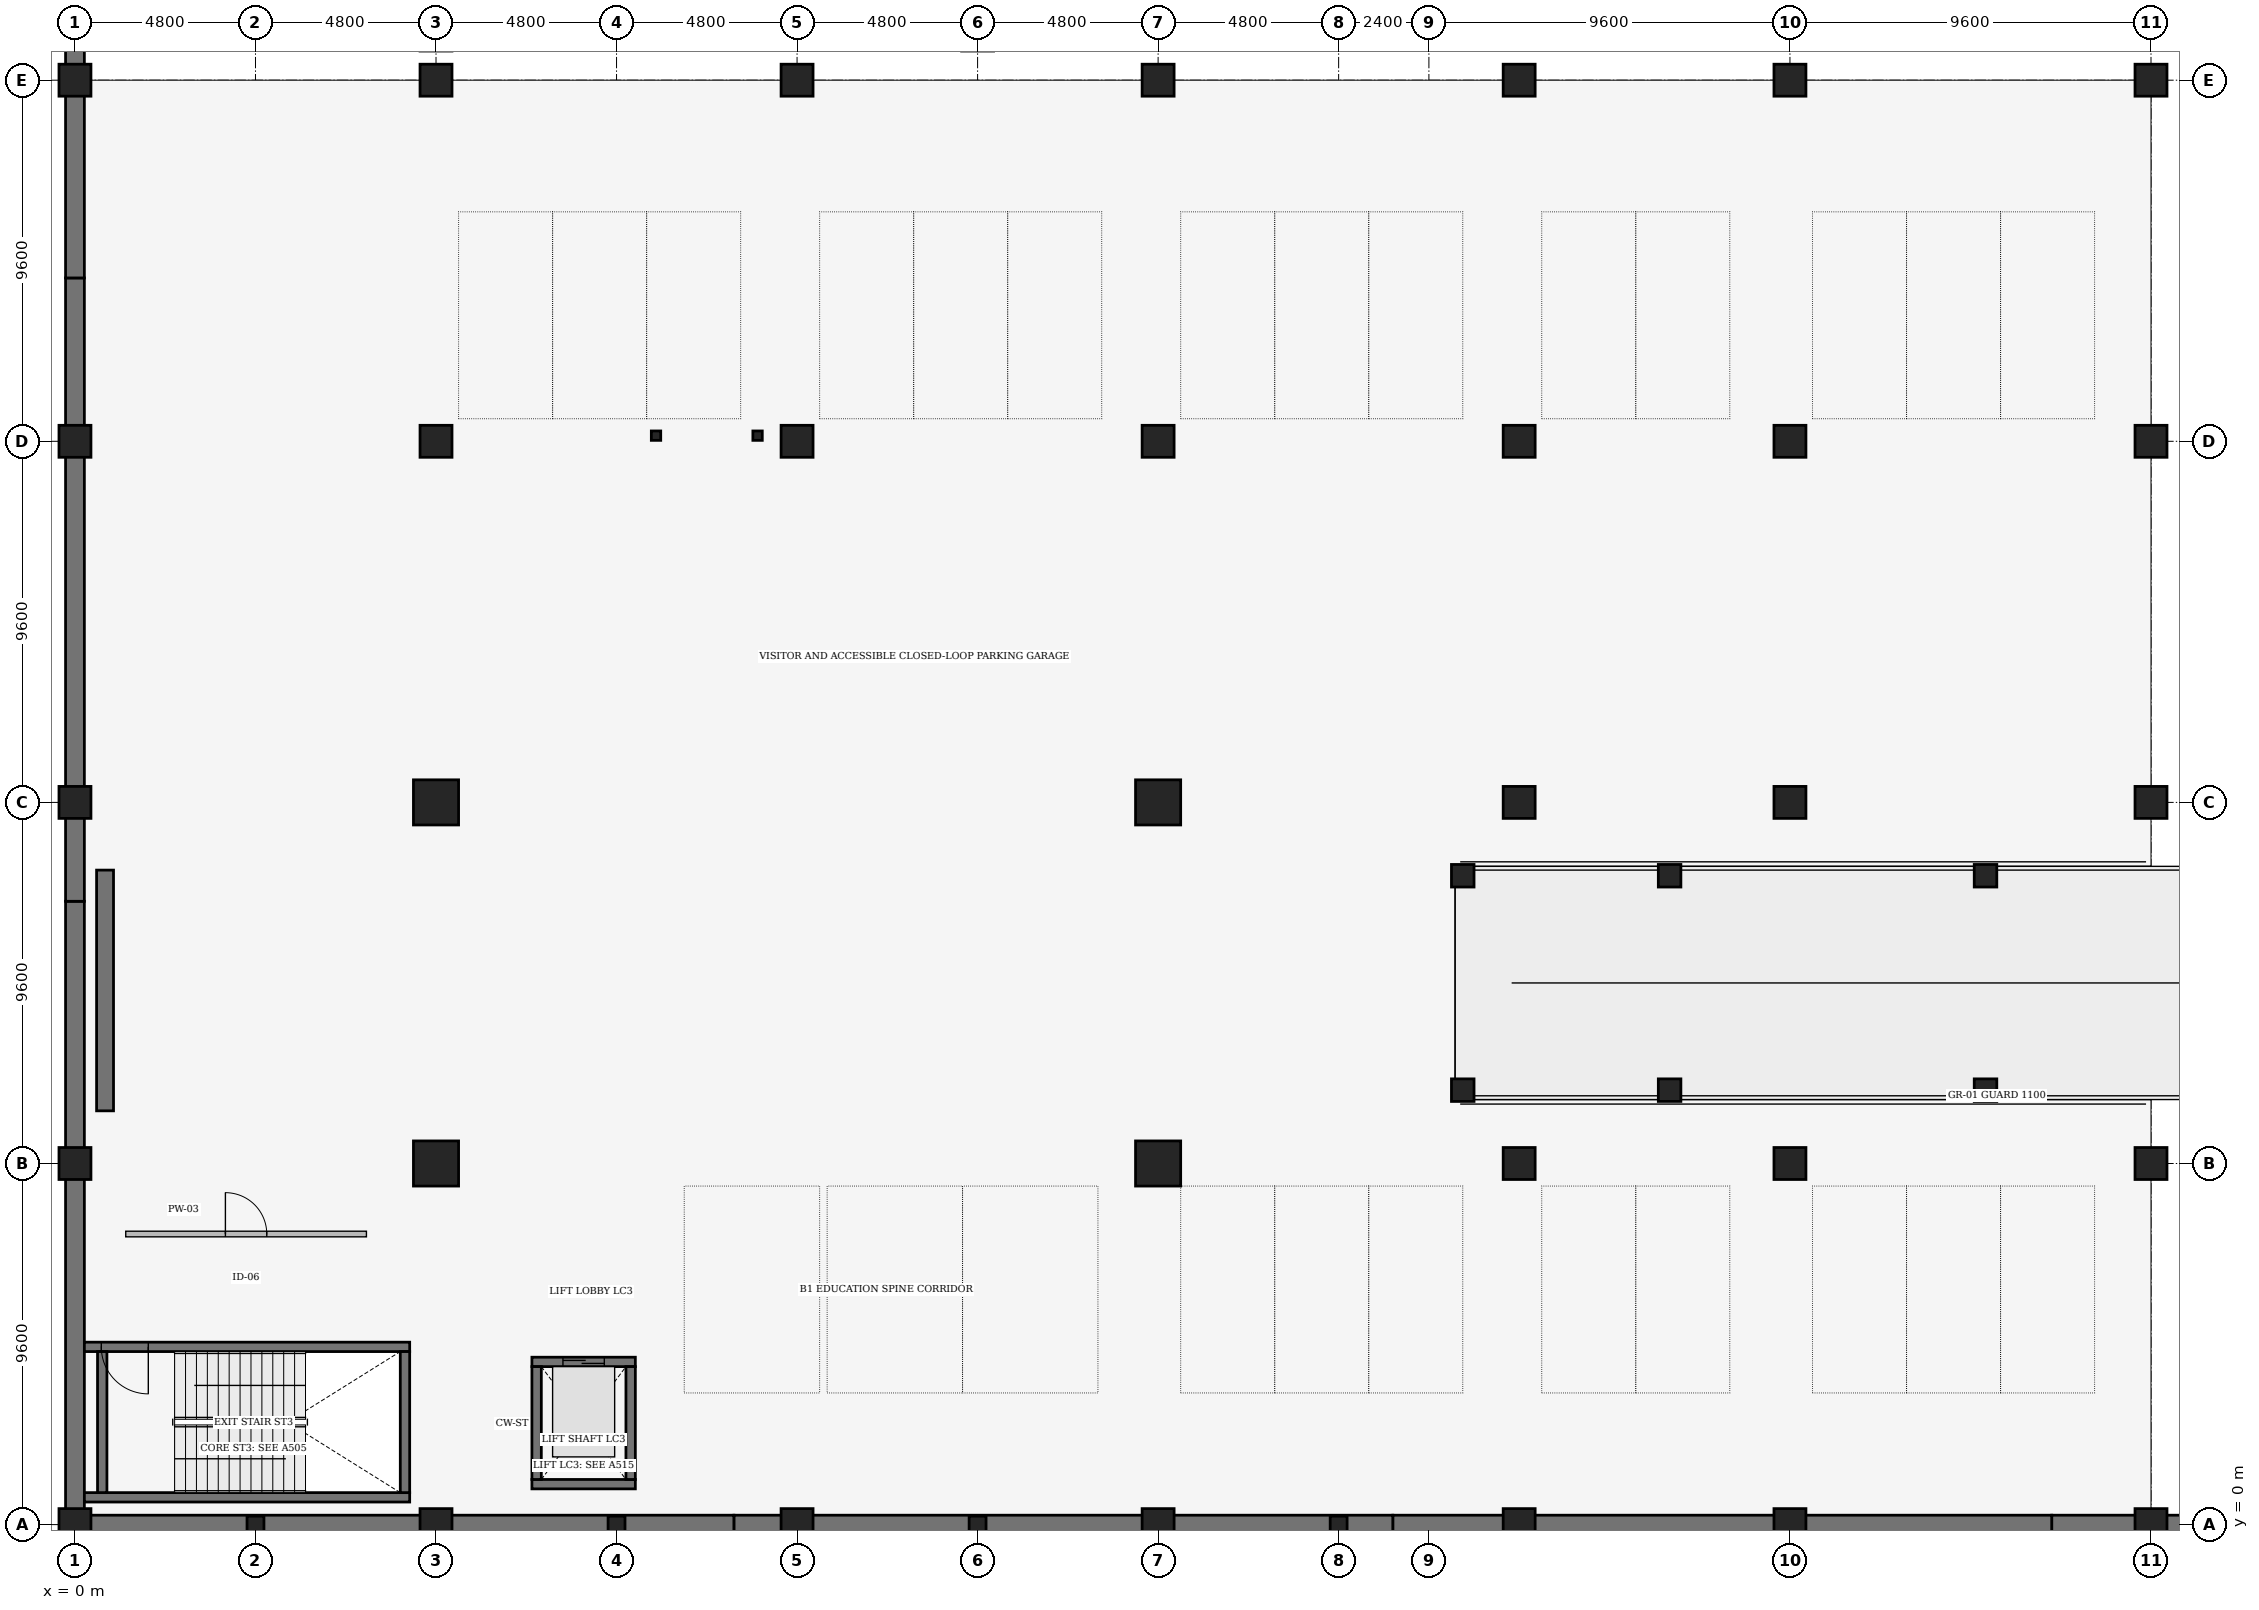
"""IFC4 building model, lengths in metres.
Left out: names, types, materials, properties, quantities, classifications, styles, units other than length and angle.
Written with IfcOpenShell. Run it as: python <this file> out.ifc"""

import sys

from ifc_helpers import new_model, si_unit, direction, frame, frame_2d, origin, origin_2d, place, context, subcontext, project, spatial, rectangle, hollow_rectangle, extrude, element, fill, save


model = new_model("IFC4")
c1 = context("Model", 3, precision=1e-05, world=origin(), true_north=direction((0.0, 1.0)))
c2 = subcontext(c1, "Body", "Model", "MODEL_VIEW")
j1 = project(units=[si_unit("LENGTHUNIT", "METRE"), si_unit("PLANEANGLEUNIT", "RADIAN")], contexts=[c1])
p1 = place(None, origin())
s1 = spatial("IfcSite", under=j1, at=p1, CompositionType="ELEMENT")
p2 = place(p1, origin())
s2 = spatial("IfcBuilding", under=s1, at=p2, CompositionType="ELEMENT")
p3 = place(p2, frame((0.0, 0.0, -4.8)))
s3 = spatial("IfcBuildingStorey", under=s2, at=p3, CompositionType="ELEMENT", Elevation=-4.8)
for number, where, z_axis, x_axis in (
    (1, (0.0, 0.0, 0.0), (0.0, 0.0, 1.0), (1.0, 0.0, 0.0)),
    (2, (0.0, 9.6, 0.0), (0.0, 0.0, 1.0), (1.0, 0.0, 0.0)),
    (3, (0.0, 19.2, 0.0), (0.0, 0.0, 1.0), (1.0, 0.0, 0.0)),
    (4, (0.0, 28.8, 0.0), (0.0, 0.0, 1.0), (1.0, 0.0, 0.0)),
    (5, (0.0, 38.4, 0.0), (0.0, 0.0, 1.0), (1.0, 0.0, 0.0)),
    (6, (9.6, 0.0, 0.0), (0.0, 0.0, 1.0), (1.0, 0.0, 0.0)),
):
    element("IfcColumn", number, at=place(p3, frame(where, z_axis=z_axis, x_axis=x_axis)), inside=s3, PredefinedType="COLUMN", context=c2, shape_type="SweptSolid", body=[
        extrude(rectangle(XDim=0.85, YDim=0.85, at=origin_2d()), origin(), (0.0, 0.0, 1.0), 4.8),
    ])
for number, where, z_axis, x_axis in (
    (7, (9.6, 9.6, 0.0), (0.0, 0.0, 1.0), (1.0, 0.0, 0.0)),
    (8, (9.6, 19.2, 0.0), (0.0, 0.0, 1.0), (1.0, 0.0, 0.0)),
):
    element("IfcColumn", number, at=place(p3, frame(where, z_axis=z_axis, x_axis=x_axis)), inside=s3, PredefinedType="COLUMN", context=c2, shape_type="SweptSolid", body=[
        extrude(rectangle(XDim=1.2, YDim=1.2, at=origin_2d()), origin(), (0.0, 0.0, 1.0), 4.8),
    ])
for number, where, z_axis, x_axis in (
    (9, (9.6, 28.8, 0.0), (0.0, 0.0, 1.0), (1.0, 0.0, 0.0)),
    (10, (9.6, 38.4, 0.0), (0.0, 0.0, 1.0), (1.0, 0.0, 0.0)),
    (11, (19.2, 0.0, 0.0), (0.0, 0.0, 1.0), (1.0, 0.0, 0.0)),
    (12, (19.2, 28.8, 0.0), (0.0, 0.0, 1.0), (1.0, 0.0, 0.0)),
    (13, (19.2, 38.4, 0.0), (0.0, 0.0, 1.0), (1.0, 0.0, 0.0)),
    (14, (28.8, 0.0, 0.0), (0.0, 0.0, 1.0), (1.0, 0.0, 0.0)),
):
    element("IfcColumn", number, at=place(p3, frame(where, z_axis=z_axis, x_axis=x_axis)), inside=s3, PredefinedType="COLUMN", context=c2, shape_type="SweptSolid", body=[
        extrude(rectangle(XDim=0.85, YDim=0.85, at=origin_2d()), origin(), (0.0, 0.0, 1.0), 4.8),
    ])
for number, where, z_axis, x_axis in (
    (15, (28.8, 9.6, 0.0), (0.0, 0.0, 1.0), (1.0, 0.0, 0.0)),
    (16, (28.8, 19.2, 0.0), (0.0, 0.0, 1.0), (1.0, 0.0, 0.0)),
):
    element("IfcColumn", number, at=place(p3, frame(where, z_axis=z_axis, x_axis=x_axis)), inside=s3, PredefinedType="COLUMN", context=c2, shape_type="SweptSolid", body=[
        extrude(rectangle(XDim=1.2, YDim=1.2, at=origin_2d()), origin(), (0.0, 0.0, 1.0), 4.8),
    ])
for number, where, z_axis, x_axis in (
    (17, (28.8, 28.8, 0.0), (0.0, 0.0, 1.0), (1.0, 0.0, 0.0)),
    (18, (28.8, 38.4, 0.0), (0.0, 0.0, 1.0), (1.0, 0.0, 0.0)),
    (19, (38.4, 0.0, 0.0), (0.0, 0.0, 1.0), (1.0, 0.0, 0.0)),
    (20, (38.4, 9.6, 0.0), (0.0, 0.0, 1.0), (1.0, 0.0, 0.0)),
    (21, (38.4, 19.2, 0.0), (0.0, 0.0, 1.0), (1.0, 0.0, 0.0)),
    (22, (38.4, 28.8, 0.0), (0.0, 0.0, 1.0), (1.0, 0.0, 0.0)),
    (23, (38.4, 38.4, 0.0), (0.0, 0.0, 1.0), (1.0, 0.0, 0.0)),
    (24, (45.6, 0.0, 0.0), (0.0, 0.0, 1.0), (1.0, 0.0, 0.0)),
    (25, (45.6, 9.6, 0.0), (0.0, 0.0, 1.0), (1.0, 0.0, 0.0)),
    (26, (45.6, 19.2, 0.0), (0.0, 0.0, 1.0), (1.0, 0.0, 0.0)),
    (27, (45.6, 28.8, 0.0), (0.0, 0.0, 1.0), (1.0, 0.0, 0.0)),
    (28, (45.6, 38.4, 0.0), (0.0, 0.0, 1.0), (1.0, 0.0, 0.0)),
    (29, (55.2, 0.0, 0.0), (0.0, 0.0, 1.0), (1.0, 0.0, 0.0)),
    (30, (55.2, 9.6, 0.0), (0.0, 0.0, 1.0), (1.0, 0.0, 0.0)),
    (31, (55.2, 19.2, 0.0), (0.0, 0.0, 1.0), (1.0, 0.0, 0.0)),
    (32, (55.2, 28.8, 0.0), (0.0, 0.0, 1.0), (1.0, 0.0, 0.0)),
    (33, (55.2, 38.4, 0.0), (0.0, 0.0, 1.0), (1.0, 0.0, 0.0)),
):
    element("IfcColumn", number, at=place(p3, frame(where, z_axis=z_axis, x_axis=x_axis)), inside=s3, PredefinedType="COLUMN", context=c2, shape_type="SweptSolid", body=[
        extrude(rectangle(XDim=0.85, YDim=0.85, at=origin_2d()), origin(), (0.0, 0.0, 1.0), 4.8),
    ])
for number, where, z_axis, x_axis in (
    (34, (4.8, 0.0, 0.0), (0.0, 0.0, 1.0), (1.0, 0.0, 0.0)),
    (35, (14.4, 0.0, 0.0), (0.0, 0.0, 1.0), (1.0, 0.0, 0.0)),
    (36, (24.0, 0.0, 0.0), (0.0, 0.0, 1.0), (1.0, 0.0, 0.0)),
    (37, (33.6, 0.0, 0.0), (0.0, 0.0, 1.0), (1.0, 0.0, 0.0)),
):
    element("IfcColumn", number, at=place(p3, frame(where, z_axis=z_axis, x_axis=x_axis)), inside=s3, PredefinedType="PILASTER", context=c2, shape_type="SweptSolid", body=[
        extrude(rectangle(XDim=0.45, YDim=0.45, at=origin_2d()), origin(), (0.0, 0.0, 1.0), 4.8),
    ])
for number, where, z_axis, x_axis in (
    (38, (15.45, 28.95, 0.0), (0.0, 0.0, 1.0), (1.0, 0.0, 0.0)),
    (39, (18.15, 28.95, 0.0), (0.0, 0.0, 1.0), (1.0, 0.0, 0.0)),
):
    element("IfcColumn", number, at=place(p3, frame(where, z_axis=z_axis, x_axis=x_axis)), inside=s3, PredefinedType="COLUMN", context=c2, shape_type="SweptSolid", body=[
        extrude(hollow_rectangle(XDim=0.25, YDim=0.25, WallThickness=0.012, InnerFilletRadius=0.012, OuterFilletRadius=0.025, at=origin_2d()), origin(), (0.0, 0.0, 1.0), 4.8),
    ])
p4 = place(p3, frame((0.0, 0.28, 0.0), z_axis=(0.0, 0.0, 1.0), x_axis=(0.0, 1.0, 0.0)))
e40 = element("IfcWall", 40, at=p4, inside=s3, PredefinedType="USERDEFINED", context=c2, shape_type="SweptSolid", body=[
    extrude(rectangle(XDim=16.291, YDim=0.5, at=frame_2d((8.146, 0.0))), origin(), (0.0, 0.0, 1.0), 4.5),
])
p5 = place(p3, frame((0.0, 16.571, 0.0), z_axis=(0.0, 0.0, 1.0), x_axis=(0.0, 1.0, 0.0)))
e41 = element("IfcWall", 41, at=p5, inside=s3, PredefinedType="USERDEFINED", context=c2, shape_type="SweptSolid", body=[
    extrude(rectangle(XDim=16.572, YDim=0.5, at=frame_2d((8.286, 0.0))), origin(), (0.0, 0.0, 1.0), 4.5),
])
p6 = place(p3, frame((0.0, 33.143, 0.0), z_axis=(0.0, 0.0, 1.0), x_axis=(0.0, 1.0, 0.0)))
e42 = element("IfcWall", 42, at=p6, inside=s3, PredefinedType="USERDEFINED", context=c2, shape_type="SweptSolid", body=[
    extrude(rectangle(XDim=16.571, YDim=0.5, at=frame_2d((8.286, 0.0))), origin(), (0.0, 0.0, 1.0), 4.5),
])
for number, where, z_axis, x_axis in (
    (43, (70.08, 0.0, 0.0), (0.0, 0.0, 1.0), (-1.0, 0.0, 0.0)),
    (44, (52.56, 0.0, 0.0), (0.0, 0.0, 1.0), (-1.0, 0.0, 0.0)),
    (45, (35.04, 0.0, 0.0), (0.0, 0.0, 1.0), (-1.0, 0.0, 0.0)),
):
    element("IfcWall", number, at=place(p3, frame(where, z_axis=z_axis, x_axis=x_axis)), inside=s3, PredefinedType="USERDEFINED", context=c2, shape_type="SweptSolid", body=[
        extrude(rectangle(XDim=17.52, YDim=0.5, at=frame_2d((8.76, 0.0))), origin(), (0.0, 0.0, 1.0), 4.5),
    ])
p7 = place(p3, frame((17.52, 0.0, 0.0), z_axis=(0.0, 0.0, 1.0), x_axis=(-1.0, 0.0, 0.0)))
e46 = element("IfcWall", 46, at=p7, inside=s3, PredefinedType="USERDEFINED", context=c2, shape_type="SweptSolid", body=[
    extrude(rectangle(XDim=17.24, YDim=0.5, at=frame_2d((8.62, 0.0))), origin(), (0.0, 0.0, 1.0), 4.5),
])
p8 = place(p3, frame((0.8, 11.0, 0.0), z_axis=(0.0, 0.0, 1.0), x_axis=(0.0, 1.0, 0.0)))
e47 = element("IfcWall", 47, at=p8, inside=s3, PredefinedType="SHEAR", context=c2, shape_type="SweptSolid", body=[
    extrude(rectangle(XDim=6.4, YDim=0.45, at=frame_2d((3.2, 0.0))), origin(), (0.0, 0.0, 1.0), 4.8),
])
p9 = place(p3, frame((0.25, 0.725, 0.0), z_axis=(0.0, 0.0, 1.0), x_axis=(1.0, 0.0, 0.0)))
e48 = element("IfcWall", 48, at=p9, inside=s3, PredefinedType="SHEAR", context=c2, shape_type="SweptSolid", body=[
    extrude(rectangle(XDim=8.65, YDim=0.25, at=frame_2d((4.325, 0.0))), origin(), (0.0, 0.0, 1.0), 4.5),
])
p10 = place(p3, frame((8.9, 4.725, 0.0), z_axis=(0.0, 0.0, 1.0), x_axis=(-1.0, 0.0, 0.0)))
e49 = element("IfcWall", 49, at=p10, inside=s3, PredefinedType="SHEAR", context=c2, shape_type="SweptSolid", body=[
    extrude(rectangle(XDim=8.65, YDim=0.25, at=frame_2d((4.325, 0.0))), origin(), (0.0, 0.0, 1.0), 4.5),
])
p11 = place(p10, frame((8.2, 0.0, 0.0), z_axis=(0.0, 0.0, 1.0), x_axis=(-1.0, 0.0, 0.0)))
e50 = element("IfcOpeningElement", 50, at=p11, cuts=e49, PredefinedType="OPENING", context=c2, shape_type="SweptSolid", body=[
    extrude(rectangle(XDim=1.25, YDim=2.2, at=frame_2d((0.625, 1.1))), frame((0.0, 0.135, 0.0), z_axis=(0.0, -1.0, 0.0), x_axis=(1.0, 0.0, 0.0)), (0.0, 0.0, 1.0), 0.27),
])
for number, where, z_axis, x_axis in (
    (51, (0.725, 4.6, 0.0), (0.0, 0.0, 1.0), (0.0, -1.0, 0.0)),
    (52, (8.775, 0.85, 0.0), (0.0, 0.0, 1.0), (0.0, 1.0, 0.0)),
):
    element("IfcWall", number, at=place(p3, frame(where, z_axis=z_axis, x_axis=x_axis)), inside=s3, PredefinedType="SHEAR", context=c2, shape_type="SweptSolid", body=[
        extrude(rectangle(XDim=3.75, YDim=0.25, at=frame_2d((1.875, 0.0))), origin(), (0.0, 0.0, 1.0), 4.5),
    ])
p12 = place(p3, frame((12.15, 1.075, 0.0), z_axis=(0.0, 0.0, 1.0), x_axis=(1.0, 0.0, 0.0)))
e53 = element("IfcWall", 53, at=p12, inside=s3, PredefinedType="SHEAR", context=c2, shape_type="SweptSolid", body=[
    extrude(rectangle(XDim=2.75, YDim=0.25, at=frame_2d((1.375, 0.0))), origin(), (0.0, 0.0, 1.0), 4.5),
])
p13 = place(p3, frame((12.15, 4.325, 0.0), z_axis=(0.0, 0.0, 1.0), x_axis=(1.0, 0.0, 0.0)))
e54 = element("IfcWall", 54, at=p13, inside=s3, PredefinedType="SHEAR", context=c2, shape_type="SweptSolid", body=[
    extrude(rectangle(XDim=2.75, YDim=0.25, at=frame_2d((1.375, 0.0))), origin(), (0.0, 0.0, 1.0), 4.5),
])
p14 = place(p13, frame((0.825, 0.0, 0.0)))
e55 = element("IfcOpeningElement", 55, at=p14, cuts=e54, PredefinedType="OPENING", context=c2, shape_type="SweptSolid", body=[
    extrude(rectangle(XDim=1.1, YDim=2.2, at=frame_2d((0.55, 1.1))), frame((0.0, 0.135, 0.0), z_axis=(0.0, -1.0, 0.0), x_axis=(1.0, 0.0, 0.0)), (0.0, 0.0, 1.0), 0.27),
])
for number, where, z_axis, x_axis in (
    (56, (12.275, 1.2, 0.0), (0.0, 0.0, 1.0), (0.0, 1.0, 0.0)),
    (57, (14.775, 1.2, 0.0), (0.0, 0.0, 1.0), (0.0, 1.0, 0.0)),
):
    element("IfcWall", number, at=place(p3, frame(where, z_axis=z_axis, x_axis=x_axis)), inside=s3, PredefinedType="SHEAR", context=c2, shape_type="SweptSolid", body=[
        extrude(rectangle(XDim=3.0, YDim=0.25, at=frame_2d((1.5, 0.0))), origin(), (0.0, 0.0, 1.0), 4.5),
    ])
for number, where, z_axis, x_axis in (
    (58, (42.4, 11.55, -4.8), (0.0, 0.0, 1.0), (1.0, 0.0, 0.0)),
    (59, (42.4, 17.25, -4.8), (0.0, 0.0, 1.0), (1.0, 0.0, 0.0)),
):
    element("IfcColumn", number, at=place(p3, frame(where, z_axis=z_axis, x_axis=x_axis)), inside=s3, PredefinedType="COLUMN", context=c2, shape_type="SweptSolid", body=[
        extrude(rectangle(XDim=0.6, YDim=0.6, at=origin_2d()), origin(), (0.0, 0.0, 1.0), 4.541),
    ])
for number, where, z_axis, x_axis in (
    (60, (50.8, 11.55, -4.8), (0.0, 0.0, 1.0), (1.0, 0.0, 0.0)),
    (61, (50.8, 17.25, -4.8), (0.0, 0.0, 1.0), (1.0, 0.0, 0.0)),
):
    element("IfcColumn", number, at=place(p3, frame(where, z_axis=z_axis, x_axis=x_axis)), inside=s3, PredefinedType="COLUMN", context=c2, shape_type="SweptSolid", body=[
        extrude(rectangle(XDim=0.6, YDim=0.6, at=origin_2d()), origin(), (0.0, 0.0, 1.0), 5.941),
    ])
for number, where, z_axis, x_axis in (
    (62, (36.9, 11.55, -4.8), (0.0, 0.0, 1.0), (1.0, 0.0, 0.0)),
    (63, (36.9, 17.25, -4.8), (0.0, 0.0, 1.0), (1.0, 0.0, 0.0)),
):
    element("IfcColumn", number, at=place(p3, frame(where, z_axis=z_axis, x_axis=x_axis)), inside=s3, PredefinedType="COLUMN", context=c2, shape_type="SweptSolid", body=[
        extrude(rectangle(XDim=0.6, YDim=0.6, at=origin_2d()), origin(), (0.0, 0.0, 1.0), 3.624),
    ])
p15 = place(p3, frame((1.35, 7.725, 0.0), z_axis=(0.0, 0.0, 1.0), x_axis=(1.0, 0.0, 0.0)))
e64 = element("IfcWall", 64, at=p15, inside=s3, PredefinedType="PARTITIONING", context=c2, shape_type="SweptSolid", body=[
    extrude(rectangle(XDim=6.4, YDim=0.15, at=frame_2d((3.2, 0.0))), origin(), (0.0, 0.0, 1.0), 4.44),
])
p16 = place(p15, frame((2.65, 0.0, 0.0)))
e65 = element("IfcOpeningElement", 65, at=p16, cuts=e64, PredefinedType="OPENING", context=c2, shape_type="SweptSolid", body=[
    extrude(rectangle(XDim=1.1, YDim=2.2, at=frame_2d((0.55, 1.1))), frame((0.0, 0.085, 0.0), z_axis=(0.0, -1.0, 0.0), x_axis=(1.0, 0.0, 0.0)), (0.0, 0.0, 1.0), 0.17),
])
p17 = place(p11, origin())
e66 = element("IfcDoor", 66, at=p17, inside=s3, OperationType="SINGLE_SWING_RIGHT", PredefinedType="DOOR", context=c2, shape_type="SweptSolid", body=[
    extrude(rectangle(XDim=1.25, YDim=2.2, at=frame_2d((0.625, 1.1))), frame((0.0, 0.025, 0.0), z_axis=(0.0, -1.0, 0.0), x_axis=(1.0, 0.0, 0.0)), (0.0, 0.0, 1.0), 0.05),
])
fill(e50, e66)
p18 = place(p14, origin())
e67 = element("IfcDoor", 67, at=p18, inside=s3, OperationType="DOUBLE_DOOR_SLIDING", PredefinedType="DOOR", context=c2, shape_type="SweptSolid", body=[
    extrude(rectangle(XDim=1.1, YDim=2.2, at=frame_2d((0.55, 1.1))), frame((0.0, 0.025, 0.0), z_axis=(0.0, -1.0, 0.0), x_axis=(1.0, 0.0, 0.0)), (0.0, 0.0, 1.0), 0.05),
])
fill(e55, e67)
p19 = place(p16, origin())
e68 = element("IfcDoor", 68, at=p19, inside=s3, OperationType="SINGLE_SWING_LEFT", PredefinedType="DOOR", context=c2, shape_type="SweptSolid", body=[
    extrude(rectangle(XDim=1.1, YDim=2.2, at=frame_2d((0.55, 1.1))), frame((0.0, 0.025, 0.0), z_axis=(0.0, -1.0, 0.0), x_axis=(1.0, 0.0, 0.0)), (0.0, 0.0, 1.0), 0.05),
])
fill(e65, e68)
save(model, sys.argv[1])
